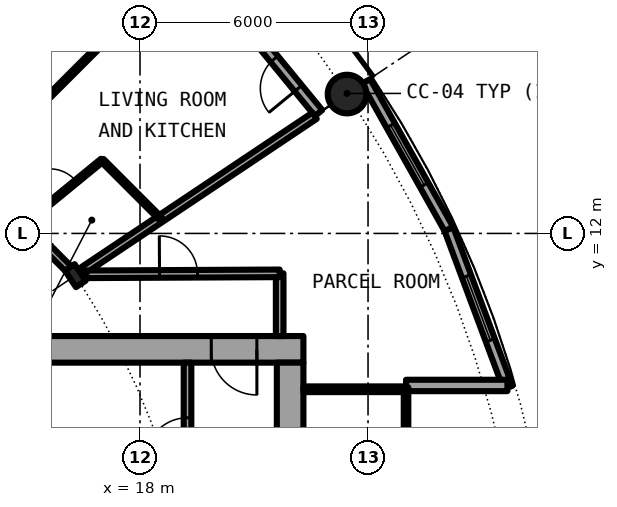
"""IFC4 building model, lengths in metres.
Left out: names, types, materials, properties, quantities, classifications, styles, units other than length and angle.
Written with IfcOpenShell. Run it as: python <this file> out.ifc"""

import sys

from ifc_helpers import new_model, si_unit, direction, frame, frame_2d, origin, origin_2d, place, context, subcontext, project, spatial, rectangle, hollow_circle, i_section, extrude, element, fill, save


model = new_model("IFC4")
c1 = context("Model", 3, precision=1e-05, world=origin(), true_north=direction((0.0, 1.0)))
c2 = subcontext(c1, "Body", "Model", "MODEL_VIEW")
j1 = project(units=[si_unit("LENGTHUNIT", "METRE"), si_unit("PLANEANGLEUNIT", "RADIAN")], contexts=[c1])
p1 = place(None, origin())
s1 = spatial("IfcSite", under=j1, at=p1, CompositionType="ELEMENT")
p2 = place(p1, origin())
s2 = spatial("IfcBuilding", under=s1, at=p2, CompositionType="ELEMENT")
p3 = place(p2, frame((0.0, 0.0, 88.0)))
s3 = spatial("IfcBuildingStorey", under=s2, at=p3, CompositionType="ELEMENT", Elevation=88.0)
p4 = place(p3, frame((23.448, 15.667, 0.0), z_axis=(0.0, 0.0, 1.0), x_axis=(1.0, 0.0, 0.0)))
e1 = element("IfcColumn", 1, at=p4, inside=s3, PredefinedType="COLUMN", context=c2, shape_type="SweptSolid", body=[
    extrude(hollow_circle(Radius=0.508, WallThickness=0.04, at=origin_2d()), origin(), (0.0, 0.0, 1.0), 3.05),
])
p5 = place(p3, frame((16.297, 10.889, 0.0), z_axis=(0.0, 0.0, 1.0), x_axis=(0.831469612303, 0.55557023302, 0.0)))
e2 = element("IfcColumn", 2, at=p5, inside=s3, PredefinedType="COLUMN", context=c2, shape_type="SweptSolid", body=[
    extrude(i_section(OverallWidth=0.306, OverallDepth=0.524, WebThickness=0.021, FlangeThickness=0.04, FilletRadius=0.027, at=origin_2d()), origin(), (0.0, 0.0, 1.0), 3.05),
])
p6 = place(p3, frame((22.699, 15.167, 0.0), z_axis=(0.0, 0.0, 1.0), x_axis=(-0.634382322723, 0.773019449054, 0.0)))
e3 = element("IfcWall", 3, at=p6, inside=s3, PredefinedType="SOLIDWALL", context=c2, shape_type="SweptSolid", body=[
    extrude(rectangle(XDim=5.352, YDim=0.25, at=frame_2d((2.676, 0.0))), origin(), (0.0, 0.0, 1.0), 2.7),
])
p7 = place(p6, frame((0.841, 0.0, 0.0)))
e4 = element("IfcOpeningElement", 4, at=p7, cuts=e3, PredefinedType="OPENING", context=c2, shape_type="SweptSolid", body=[
    extrude(rectangle(XDim=1.0, YDim=2.2, at=frame_2d((0.5, 1.1))), frame((0.0, 0.135, 0.0), z_axis=(0.0, -1.0, 0.0), x_axis=(1.0, 0.0, 0.0)), (0.0, 0.0, 1.0), 0.27),
])
p8 = place(p6, frame((3.111, 0.0, 0.3)))
e5 = element("IfcOpeningElement", 5, at=p8, cuts=e3, PredefinedType="OPENING", context=c2, shape_type="SweptSolid", body=[
    extrude(rectangle(XDim=1.8, YDim=2.1, at=frame_2d((0.9, 1.05))), frame((0.0, 0.135, 0.0), z_axis=(0.0, -1.0, 0.0), x_axis=(1.0, 0.0, 0.0)), (0.0, 0.0, 1.0), 0.27),
])
p9 = place(p3, frame((27.682, 7.945, 0.0), z_axis=(0.0, 0.0, 1.0), x_axis=(-0.349247811493, 0.937030397675, 0.0)))
e6 = element("IfcWall", 6, at=p9, inside=s3, PredefinedType="SOLIDWALL", context=c2, shape_type="SweptSolid", body=[
    extrude(rectangle(XDim=4.452, YDim=0.25, at=frame_2d((2.226, 0.0))), origin(), (0.0, 0.0, 1.0), 2.7),
])
p10 = place(p9, frame((1.327, 0.0, 0.3)))
e7 = element("IfcOpeningElement", 7, at=p10, cuts=e6, PredefinedType="OPENING", context=c2, shape_type="SweptSolid", body=[
    extrude(rectangle(XDim=1.8, YDim=2.1, at=frame_2d((0.9, 1.05))), frame((0.0, 0.135, 0.0), z_axis=(0.0, -1.0, 0.0), x_axis=(1.0, 0.0, 0.0)), (0.0, 0.0, 1.0), 0.27),
])
p11 = place(p3, frame((26.127, 12.117, 0.0), z_axis=(0.0, 0.0, 1.0), x_axis=(-0.489696356642, 0.871893042919, 0.0)))
e8 = element("IfcWall", 8, at=p11, inside=s3, PredefinedType="SOLIDWALL", context=c2, shape_type="SweptSolid", body=[
    extrude(rectangle(XDim=4.454, YDim=0.25, at=frame_2d((2.227, 0.0))), origin(), (0.0, 0.0, 1.0), 2.7),
])
p12 = place(p11, frame((1.327, 0.0, 0.3)))
e9 = element("IfcOpeningElement", 9, at=p12, cuts=e8, PredefinedType="OPENING", context=c2, shape_type="SweptSolid", body=[
    extrude(rectangle(XDim=1.8, YDim=2.1, at=frame_2d((0.9, 1.05))), frame((0.0, 0.135, 0.0), z_axis=(0.0, -1.0, 0.0), x_axis=(1.0, 0.0, 0.0)), (0.0, 0.0, 1.0), 0.27),
])
p13 = place(p3, frame((25.0, 8.0, 0.0), z_axis=(0.0, 0.0, 1.0), x_axis=(1.0, 0.0, 0.0)))
e10 = element("IfcWall", 10, at=p13, inside=s3, PredefinedType="SOLIDWALL", context=c2, shape_type="SweptSolid", body=[
    extrude(rectangle(XDim=2.667, YDim=0.3, at=frame_2d((1.333, 0.0))), origin(), (0.0, 0.0, 1.0), 2.7),
])
p14 = place(p3, frame((22.3, 8.95, 0.0), z_axis=(0.0, 0.0, 1.0), x_axis=(-1.0, 0.0, 0.0)))
e11 = element("IfcWall", 11, at=p14, inside=s3, PredefinedType="SHEAR", context=c2, shape_type="SweptSolid", body=[
    extrude(rectangle(XDim=14.0, YDim=0.7, at=frame_2d((7.0, 0.0))), origin(), (0.0, 0.0, 1.0), 3.05),
])
p15 = place(p14, frame((1.225, 0.0, 0.0)))
e12 = element("IfcOpeningElement", 12, at=p15, cuts=e11, PredefinedType="OPENING", context=c2, shape_type="SweptSolid", body=[
    extrude(rectangle(XDim=1.2, YDim=2.3, at=frame_2d((0.6, 1.15))), frame((0.0, 0.36, 0.0), z_axis=(0.0, -1.0, 0.0), x_axis=(1.0, 0.0, 0.0)), (0.0, 0.0, 1.0), 0.72),
])
p16 = place(p3, frame((21.95, 8.6, 0.0), z_axis=(0.0, 0.0, 1.0), x_axis=(0.0, -1.0, 0.0)))
e13 = element("IfcWall", 13, at=p16, inside=s3, PredefinedType="SHEAR", context=c2, shape_type="SweptSolid", body=[
    extrude(rectangle(XDim=17.2, YDim=0.7, at=frame_2d((8.6, 0.0))), origin(), (0.0, 0.0, 1.0), 3.05),
])
p17 = place(p16, frame((7.7, 0.0, 0.0)))
e14 = element("IfcOpeningElement", 14, at=p17, cuts=e13, PredefinedType="OPENING", context=c2, shape_type="SweptSolid", body=[
    extrude(rectangle(XDim=1.8, YDim=2.3, at=frame_2d((0.9, 1.15))), frame((0.0, 0.36, 0.0), z_axis=(0.0, -1.0, 0.0), x_axis=(1.0, 0.0, 0.0)), (0.0, 0.0, 1.0), 0.72),
])
p18 = place(p3, frame((19.25, 1.575, 0.0), z_axis=(0.0, 0.0, 1.0), x_axis=(0.0, 1.0, 0.0)))
e15 = element("IfcWall", 15, at=p18, inside=s3, PredefinedType="SOLIDWALL", context=c2, shape_type="SweptSolid", body=[
    extrude(rectangle(XDim=7.025, YDim=0.2, at=frame_2d((3.513, 0.0))), origin(), (0.0, 0.0, 1.0), 2.7),
])
p19 = place(p18, frame((4.475, 0.0, 0.0)))
e16 = element("IfcOpeningElement", 16, at=p19, cuts=e15, PredefinedType="OPENING", context=c2, shape_type="SweptSolid", body=[
    extrude(rectangle(XDim=1.1, YDim=2.3, at=frame_2d((0.55, 1.15))), frame((0.0, 0.11, 0.0), z_axis=(0.0, -1.0, 0.0), x_axis=(1.0, 0.0, 0.0)), (0.0, 0.0, 1.0), 0.22),
])
p20 = place(p3, frame((22.3, 7.9, 0.0), z_axis=(0.0, 0.0, 1.0), x_axis=(1.0, 0.0, 0.0)))
e17 = element("IfcWall", 17, at=p20, inside=s3, PredefinedType="PARTITIONING", context=c2, shape_type="SweptSolid", body=[
    extrude(rectangle(XDim=2.64, YDim=0.15, at=frame_2d((1.32, 0.0))), origin(), (0.0, 0.0, 1.0), 2.7),
])
p21 = place(p3, frame((25.0, -7.95, 0.0), z_axis=(0.0, 0.0, 1.0), x_axis=(0.0, 1.0, 0.0)))
e18 = element("IfcWall", 18, at=p21, inside=s3, PredefinedType="PARTITIONING", context=c2, shape_type="SweptSolid", body=[
    extrude(rectangle(XDim=15.9, YDim=0.12, at=frame_2d((7.95, 0.0))), origin(), (0.0, 0.0, 1.0), 2.7),
])
p22 = place(p21, frame((0.95, 0.0, 0.1)))
e19 = element("IfcOpeningElement", 19, at=p22, cuts=e18, PredefinedType="OPENING", context=c2, shape_type="SweptSolid", body=[
    extrude(rectangle(XDim=14.0, YDim=2.35, at=frame_2d((7.0, 1.175))), frame((0.0, 0.07, 0.0), z_axis=(0.0, -1.0, 0.0), x_axis=(1.0, 0.0, 0.0)), (0.0, 0.0, 1.0), 0.14),
])
p23 = place(p3, frame((21.675, 9.3, 0.0), z_axis=(0.0, 0.0, 1.0), x_axis=(0.0, 1.0, 0.0)))
e20 = element("IfcWall", 20, at=p23, inside=s3, PredefinedType="PARTITIONING", context=c2, shape_type="SweptSolid", body=[
    extrude(rectangle(XDim=1.65, YDim=0.2, at=frame_2d((0.825, 0.0))), origin(), (0.0, 0.0, 1.0), 2.7),
])
p24 = place(p3, frame((14.945, 12.241, 0.0), z_axis=(0.0, 0.0, 1.0), x_axis=(0.77367517848, 0.633582447834, 0.0)))
e21 = element("IfcWall", 21, at=p24, inside=s3, PredefinedType="PARTITIONING", context=c2, shape_type="SweptSolid", body=[
    extrude(rectangle(XDim=2.661, YDim=0.1, at=frame_2d((1.331, 0.0))), origin(), (0.0, 0.0, 1.0), 2.7),
])
p25 = place(p24, frame((0.881, 0.0, 0.0)))
e22 = element("IfcOpeningElement", 22, at=p25, cuts=e21, PredefinedType="OPENING", context=c2, shape_type="SweptSolid", body=[
    extrude(rectangle(XDim=0.9, YDim=2.3, at=frame_2d((0.45, 1.15))), frame((0.0, 0.06, 0.0), z_axis=(0.0, -1.0, 0.0), x_axis=(1.0, 0.0, 0.0)), (0.0, 0.0, 1.0), 0.12),
])
p26 = place(p3, frame((15.465, 15.465, 0.0), z_axis=(0.0, 0.0, 1.0), x_axis=(0.707106781187, 0.707106781187, 0.0)))
e23 = element("IfcWall", 23, at=p26, inside=s3, PredefinedType="PARTITIONING", context=c2, shape_type="SweptSolid", body=[
    extrude(rectangle(XDim=5.305, YDim=0.1, at=frame_2d((2.652, 0.0))), origin(), (0.0, 0.0, 1.0), 2.7),
])
p27 = place(p26, frame((2.202, 0.0, 0.0)))
e24 = element("IfcOpeningElement", 24, at=p27, cuts=e23, PredefinedType="OPENING", context=c2, shape_type="SweptSolid", body=[
    extrude(rectangle(XDim=0.9, YDim=2.3, at=frame_2d((0.45, 1.15))), frame((0.0, 0.06, 0.0), z_axis=(0.0, -1.0, 0.0), x_axis=(1.0, 0.0, 0.0)), (0.0, 0.0, 1.0), 0.12),
])
p28 = place(p3, frame((16.515, 11.034, 0.0), z_axis=(0.0, 0.0, 1.0), x_axis=(0.831382022135, 0.555701298605, 0.0)))
e25 = element("IfcWall", 25, at=p28, inside=s3, PredefinedType="PARTITIONING", context=c2, shape_type="SweptSolid", body=[
    extrude(rectangle(XDim=7.313, YDim=0.2, at=frame_2d((3.657, 0.0))), origin(), (0.0, 0.0, 1.0), 2.7),
])
p29 = place(p3, frame((16.588, 10.925, 0.0), z_axis=(0.0, 0.0, 1.0), x_axis=(0.999988019025, 0.004895079807, 0.0)))
e26 = element("IfcWall", 26, at=p29, inside=s3, PredefinedType="PARTITIONING", context=c2, shape_type="SweptSolid", body=[
    extrude(rectangle(XDim=5.087, YDim=0.2, at=frame_2d((2.543, 0.0))), origin(), (0.0, 0.0, 1.0), 2.7),
])
p30 = place(p29, frame((1.925, 0.0, 0.0)))
e27 = element("IfcOpeningElement", 27, at=p30, cuts=e26, PredefinedType="OPENING", context=c2, shape_type="SweptSolid", body=[
    extrude(rectangle(XDim=1.0, YDim=2.3, at=frame_2d((0.5, 1.15))), frame((0.0, 0.11, 0.0), z_axis=(0.0, -1.0, 0.0), x_axis=(1.0, 0.0, 0.0)), (0.0, 0.0, 1.0), 0.22),
])
p31 = place(p3, frame((11.0, 16.186, 0.0), z_axis=(0.0, 0.0, 1.0), x_axis=(0.707106781187, -0.707106781187, 0.0)))
e28 = element("IfcWall", 28, at=p31, inside=s3, PredefinedType="PARTITIONING", context=c2, shape_type="SweptSolid", body=[
    extrude(rectangle(XDim=7.334, YDim=0.2, at=frame_2d((3.667, 0.0))), origin(), (0.0, 0.0, 1.0), 2.38),
])
p32 = place(p31, frame((2.211, 0.0, 0.0)))
e29 = element("IfcOpeningElement", 29, at=p32, cuts=e28, PredefinedType="OPENING", context=c2, shape_type="SweptSolid", body=[
    extrude(rectangle(XDim=1.0, YDim=2.3, at=frame_2d((0.5, 1.15))), frame((0.0, 0.11, 0.0), z_axis=(0.0, -1.0, 0.0), x_axis=(1.0, 0.0, 0.0)), (0.0, 0.0, 1.0), 0.22),
])
p33 = place(p3, frame((17.006, 13.924, 0.0), z_axis=(0.0, 0.0, 1.0), x_axis=(0.706826194425, -0.707387256653, 0.0)))
e30 = element("IfcWall", 30, at=p33, inside=s3, PredefinedType="PARTITIONING", context=c2, shape_type="SweptSolid", body=[
    extrude(rectangle(XDim=2.176, YDim=0.1, at=frame_2d((1.088, 0.0))), origin(), (0.0, 0.0, 1.0), 2.7),
])
p34 = place(p7, origin())
e31 = element("IfcDoor", 31, at=p34, inside=s3, OperationType="SINGLE_SWING_LEFT", PredefinedType="DOOR", context=c2, shape_type="SweptSolid", body=[
    extrude(rectangle(XDim=1.0, YDim=2.2, at=frame_2d((0.5, 1.1))), frame((0.0, 0.025, 0.0), z_axis=(0.0, -1.0, 0.0), x_axis=(1.0, 0.0, 0.0)), (0.0, 0.0, 1.0), 0.05),
])
fill(e4, e31)
p35 = place(p10, origin())
e32 = element("IfcWindow", 32, at=p35, inside=s3, PartitioningType="SINGLE_PANEL", PredefinedType="WINDOW", context=c2, shape_type="SweptSolid", body=[
    extrude(rectangle(XDim=1.8, YDim=2.1, at=frame_2d((0.9, 1.05))), frame((0.0, 0.03, 0.0), z_axis=(0.0, -1.0, 0.0), x_axis=(1.0, 0.0, 0.0)), (0.0, 0.0, 1.0), 0.06),
])
fill(e7, e32)
p36 = place(p12, origin())
e33 = element("IfcWindow", 33, at=p36, inside=s3, PartitioningType="SINGLE_PANEL", PredefinedType="WINDOW", context=c2, shape_type="SweptSolid", body=[
    extrude(rectangle(XDim=1.8, YDim=2.1, at=frame_2d((0.9, 1.05))), frame((0.0, 0.03, 0.0), z_axis=(0.0, -1.0, 0.0), x_axis=(1.0, 0.0, 0.0)), (0.0, 0.0, 1.0), 0.06),
])
fill(e9, e33)
p37 = place(p19, origin())
e34 = element("IfcDoor", 34, at=p37, inside=s3, OperationType="SINGLE_SWING_LEFT", PredefinedType="DOOR", context=c2, shape_type="SweptSolid", body=[
    extrude(rectangle(XDim=1.1, YDim=2.3, at=frame_2d((0.55, 1.15))), frame((0.0, 0.025, 0.0), z_axis=(0.0, -1.0, 0.0), x_axis=(1.0, 0.0, 0.0)), (0.0, 0.0, 1.0), 0.05),
])
fill(e16, e34)
p38 = place(p15, origin())
e35 = element("IfcDoor", 35, at=p38, inside=s3, OperationType="SINGLE_SWING_RIGHT", PredefinedType="DOOR", context=c2, shape_type="SweptSolid", body=[
    extrude(rectangle(XDim=1.2, YDim=2.3, at=frame_2d((0.6, 1.15))), frame((0.0, 0.025, 0.0), z_axis=(0.0, -1.0, 0.0), x_axis=(1.0, 0.0, 0.0)), (0.0, 0.0, 1.0), 0.05),
])
fill(e12, e35)
p39 = place(p22, origin())
e36 = element("IfcWindow", 36, at=p39, inside=s3, PartitioningType="SINGLE_PANEL", PredefinedType="WINDOW", context=c2, shape_type="SweptSolid", body=[
    extrude(rectangle(XDim=14.0, YDim=2.35, at=frame_2d((7.0, 1.175))), frame((0.0, 0.03, 0.0), z_axis=(0.0, -1.0, 0.0), x_axis=(1.0, 0.0, 0.0)), (0.0, 0.0, 1.0), 0.06),
])
fill(e19, e36)
p40 = place(p25, origin())
e37 = element("IfcDoor", 37, at=p40, inside=s3, OperationType="SINGLE_SWING_LEFT", PredefinedType="DOOR", context=c2, shape_type="SweptSolid", body=[
    extrude(rectangle(XDim=0.9, YDim=2.3, at=frame_2d((0.45, 1.15))), frame((0.0, 0.025, 0.0), z_axis=(0.0, -1.0, 0.0), x_axis=(1.0, 0.0, 0.0)), (0.0, 0.0, 1.0), 0.05),
])
fill(e22, e37)
p41 = place(p30, origin())
e38 = element("IfcDoor", 38, at=p41, inside=s3, OperationType="SINGLE_SWING_LEFT", PredefinedType="DOOR", context=c2, shape_type="SweptSolid", body=[
    extrude(rectangle(XDim=1.0, YDim=2.3, at=frame_2d((0.5, 1.15))), frame((0.0, 0.025, 0.0), z_axis=(0.0, -1.0, 0.0), x_axis=(1.0, 0.0, 0.0)), (0.0, 0.0, 1.0), 0.05),
])
fill(e27, e38)
save(model, sys.argv[1])
